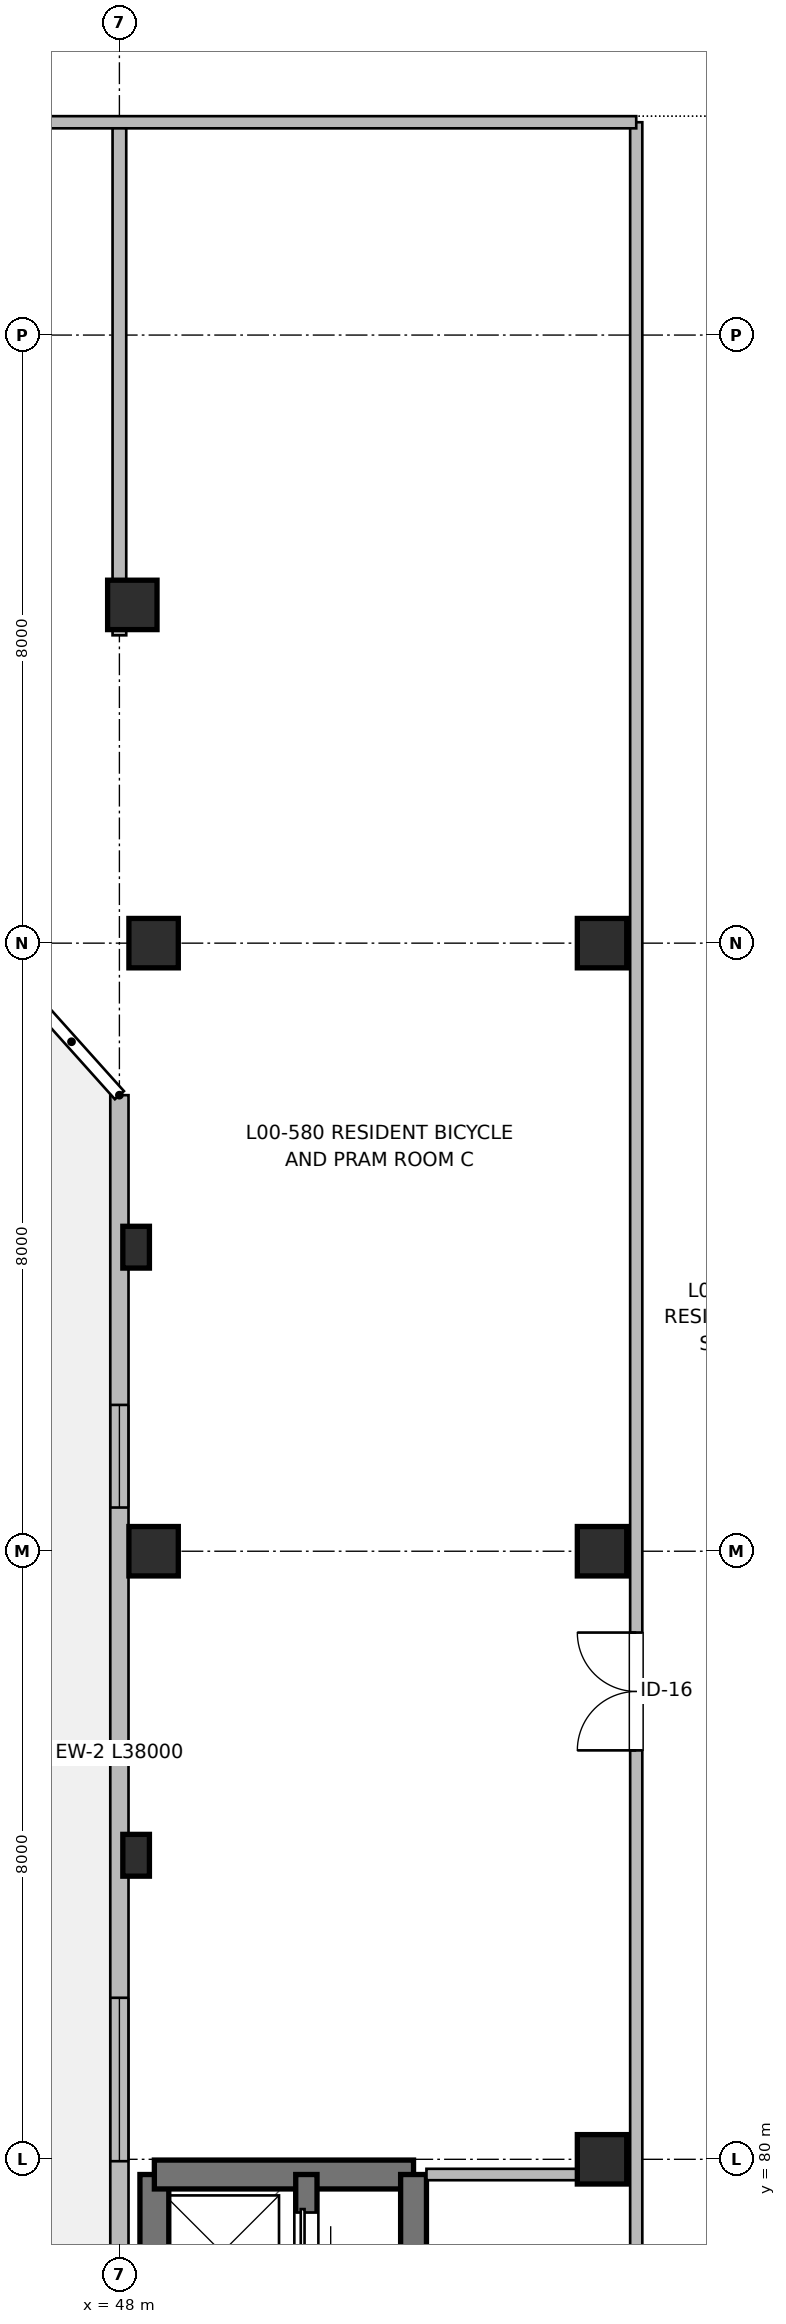
"""IFC4 building model, lengths in metres.
Left out: names, types, materials, properties, quantities, classifications, styles, units other than length and angle.
Written with IfcOpenShell. Run it as: python <this file> out.ifc"""

import sys

from ifc_helpers import new_model, si_unit, direction, frame, frame_2d, origin, origin_2d, place, context, subcontext, project, spatial, rectangle, extrude, element, fill, save


model = new_model("IFC4")
c1 = context("Model", 3, precision=1e-05, world=origin(), true_north=direction((0.0, 1.0)))
c2 = subcontext(c1, "Body", "Model", "MODEL_VIEW")
j1 = project(units=[si_unit("LENGTHUNIT", "METRE"), si_unit("PLANEANGLEUNIT", "RADIAN")], contexts=[c1])
p1 = place(None, origin())
s1 = spatial("IfcSite", under=j1, at=p1, CompositionType="ELEMENT")
p2 = place(p1, origin())
s2 = spatial("IfcBuilding", under=s1, at=p2, CompositionType="ELEMENT")
p3 = place(p2, origin())
s3 = spatial("IfcBuildingStorey", under=s2, at=p3, CompositionType="ELEMENT", Elevation=0.0)
p4 = place(p3, frame((48.17, 100.45, 0.0), z_axis=(0.0, 0.0, 1.0), x_axis=(1.0, 0.0, 0.0)))
e1 = element("IfcColumn", 1, at=p4, inside=s3, PredefinedType="COLUMN", context=c2, shape_type="SweptSolid", body=[
    extrude(rectangle(XDim=0.65, YDim=0.65, at=origin_2d()), origin(), (0.0, 0.0, 1.0), 4.16),
])
for number, where, z_axis, x_axis in (
    (2, (48.22, 84.0, 0.0), (0.0, 0.0, 1.0), (1.0, 0.0, 0.0)),
    (3, (48.22, 92.0, 0.0), (0.0, 0.0, 1.0), (1.0, 0.0, 0.0)),
):
    element("IfcColumn", number, at=place(p3, frame(where, z_axis=z_axis, x_axis=x_axis)), inside=s3, PredefinedType="PILASTER", context=c2, shape_type="SweptSolid", body=[
        extrude(rectangle(XDim=0.35, YDim=0.55, at=origin_2d()), origin(), (0.0, 0.0, 1.0), 4.16),
    ])
for number, where, z_axis, x_axis in (
    (4, (48.45, 88.0, 0.0), (0.0, 0.0, 1.0), (1.0, 0.0, 0.0)),
    (5, (48.45, 96.0, 0.0), (0.0, 0.0, 1.0), (1.0, 0.0, 0.0)),
    (6, (54.35, 80.0, 0.0), (0.0, 0.0, 1.0), (1.0, 0.0, 0.0)),
    (7, (54.35, 88.0, 0.0), (0.0, 0.0, 1.0), (1.0, 0.0, 0.0)),
    (8, (54.35, 96.0, 0.0), (0.0, 0.0, 1.0), (1.0, 0.0, 0.0)),
):
    element("IfcColumn", number, at=place(p3, frame(where, z_axis=z_axis, x_axis=x_axis)), inside=s3, PredefinedType="COLUMN", context=c2, shape_type="SweptSolid", body=[
        extrude(rectangle(XDim=0.65, YDim=0.65, at=origin_2d()), origin(), (0.0, 0.0, 1.0), 4.16),
    ])
p5 = place(p3, frame((48.46, 67.35, 0.0), z_axis=(0.0, 0.0, 1.0), x_axis=(0.0, 1.0, 0.0)))
e9 = element("IfcWall", 9, at=p5, inside=s3, PredefinedType="SHEAR", context=c2, shape_type="SweptSolid", body=[
    extrude(rectangle(XDim=12.45, YDim=0.38, at=frame_2d((6.225, 0.0))), origin(), (0.0, 0.0, 1.0), 4.16),
])
p6 = place(p5, frame((2.2, 0.0, 1.2)))
e10 = element("IfcOpeningElement", 10, at=p6, cuts=e9, PredefinedType="OPENING", context=c2, shape_type="SweptSolid", body=[
    extrude(rectangle(XDim=0.95, YDim=1.25, at=frame_2d((0.475, 0.625))), frame((0.0, 0.2, 0.0), z_axis=(0.0, -1.0, 0.0), x_axis=(1.0, 0.0, 0.0)), (0.0, 0.0, 1.0), 0.4),
])
p7 = place(p3, frame((48.46, 79.8, 0.0), z_axis=(0.0, 0.0, 1.0), x_axis=(1.0, 0.0, 0.0)))
e11 = element("IfcWall", 11, at=p7, inside=s3, PredefinedType="SHEAR", context=c2, shape_type="SweptSolid", body=[
    extrude(rectangle(XDim=3.41, YDim=0.38, at=frame_2d((1.705, 0.0))), origin(), (0.0, 0.0, 1.0), 4.16),
])
p8 = place(p3, frame((51.87, 79.8, 0.0), z_axis=(0.0, 0.0, 1.0), x_axis=(0.0, -1.0, 0.0)))
e12 = element("IfcWall", 12, at=p8, inside=s3, PredefinedType="SHEAR", context=c2, shape_type="SweptSolid", body=[
    extrude(rectangle(XDim=12.45, YDim=0.34, at=frame_2d((6.225, 0.0))), origin(), (0.0, 0.0, 1.0), 4.16),
])
p9 = place(p8, frame((10.85, 0.0, 0.0)))
e13 = element("IfcOpeningElement", 13, at=p9, cuts=e12, PredefinedType="OPENING", context=c2, shape_type="SweptSolid", body=[
    extrude(rectangle(XDim=1.05, YDim=2.15, at=frame_2d((0.525, 1.075))), frame((0.0, 0.18, 0.0), z_axis=(0.0, -1.0, 0.0), x_axis=(1.0, 0.0, 0.0)), (0.0, 0.0, 1.0), 0.36),
])
p10 = place(p3, frame((50.46, 74.55, 0.0), z_axis=(0.0, 0.0, 1.0), x_axis=(0.0, 1.0, 0.0)))
e14 = element("IfcWall", 14, at=p10, inside=s3, PredefinedType="SHEAR", context=c2, shape_type="SweptSolid", body=[
    extrude(rectangle(XDim=5.25, YDim=0.28, at=frame_2d((2.625, 0.0))), origin(), (0.0, 0.0, 1.0), 4.16),
])
p11 = place(p10, frame((1.15, 0.0, 0.0)))
e15 = element("IfcOpeningElement", 15, at=p11, cuts=e14, PredefinedType="OPENING", context=c2, shape_type="SweptSolid", body=[
    extrude(rectangle(XDim=1.0, YDim=2.15, at=frame_2d((0.5, 1.075))), frame((0.0, 0.15, 0.0), z_axis=(0.0, -1.0, 0.0), x_axis=(1.0, 0.0, 0.0)), (0.0, 0.0, 1.0), 0.3),
])
p12 = place(p10, frame((3.85, 0.0, 0.0)))
e16 = element("IfcOpeningElement", 16, at=p12, cuts=e14, PredefinedType="OPENING", context=c2, shape_type="SweptSolid", body=[
    extrude(rectangle(XDim=0.9, YDim=2.15, at=frame_2d((0.45, 1.075))), frame((0.0, 0.15, 0.0), z_axis=(0.0, -1.0, 0.0), x_axis=(1.0, 0.0, 0.0)), (0.0, 0.0, 1.0), 0.3),
])
p13 = place(p3, frame((48.0, 56.0, 0.0), z_axis=(0.0, 0.0, 1.0), x_axis=(0.0, 1.0, 0.0)))
e17 = element("IfcWall", 17, at=p13, inside=s3, PredefinedType="SOLIDWALL", context=c2, shape_type="SweptSolid", body=[
    extrude(rectangle(XDim=38.0, YDim=0.24, at=frame_2d((19.0, 0.0))), origin(), (0.0, 0.0, 1.0), 3.94),
])
p14 = place(p13, frame((3.675, 0.0, 0.95)))
e18 = element("IfcOpeningElement", 18, at=p14, cuts=e17, PredefinedType="OPENING", context=c2, shape_type="SweptSolid", body=[
    extrude(rectangle(XDim=2.15, YDim=1.8, at=frame_2d((1.075, 0.9))), frame((0.0, 0.13, 0.0), z_axis=(0.0, -1.0, 0.0), x_axis=(1.0, 0.0, 0.0)), (0.0, 0.0, 1.0), 0.26),
])
p15 = place(p13, frame((13.575, 0.0, 0.95)))
e19 = element("IfcOpeningElement", 19, at=p15, cuts=e17, PredefinedType="OPENING", context=c2, shape_type="SweptSolid", body=[
    extrude(rectangle(XDim=1.35, YDim=1.3, at=frame_2d((0.675, 0.65))), frame((0.0, 0.13, 0.0), z_axis=(0.0, -1.0, 0.0), x_axis=(1.0, 0.0, 0.0)), (0.0, 0.0, 1.0), 0.26),
])
p16 = place(p13, frame((23.975, 0.0, 0.95)))
e20 = element("IfcOpeningElement", 20, at=p16, cuts=e17, PredefinedType="OPENING", context=c2, shape_type="SweptSolid", body=[
    extrude(rectangle(XDim=2.15, YDim=1.8, at=frame_2d((1.075, 0.9))), frame((0.0, 0.13, 0.0), z_axis=(0.0, -1.0, 0.0), x_axis=(1.0, 0.0, 0.0)), (0.0, 0.0, 1.0), 0.26),
])
p17 = place(p13, frame((32.575, 0.0, 0.95)))
e21 = element("IfcOpeningElement", 21, at=p17, cuts=e17, PredefinedType="OPENING", context=c2, shape_type="SweptSolid", body=[
    extrude(rectangle(XDim=1.35, YDim=1.3, at=frame_2d((0.675, 0.65))), frame((0.0, 0.13, 0.0), z_axis=(0.0, -1.0, 0.0), x_axis=(1.0, 0.0, 0.0)), (0.0, 0.0, 1.0), 0.26),
])
p18 = place(p3, frame((52.04, 79.8, 0.0), z_axis=(0.0, 0.0, 1.0), x_axis=(1.0, 0.0, 0.0)))
e22 = element("IfcWall", 22, at=p18, inside=s3, PredefinedType="PARTITIONING", context=c2, shape_type="SweptSolid", body=[
    extrude(rectangle(XDim=2.68, YDim=0.15, at=frame_2d((1.34, 0.0))), origin(), (0.0, 0.0, 1.0), 3.895),
])
p19 = place(p3, frame((54.8, 56.18, 0.0), z_axis=(0.0, 0.0, 1.0), x_axis=(0.0, 1.0, 0.0)))
e23 = element("IfcWall", 23, at=p19, inside=s3, PredefinedType="PARTITIONING", context=c2, shape_type="SweptSolid", body=[
    extrude(rectangle(XDim=50.62, YDim=0.16, at=frame_2d((25.31, 0.0))), origin(), (0.0, 0.0, 1.0), 3.895),
])
p20 = place(p19, frame((12.82, 0.0, 0.0)))
e24 = element("IfcOpeningElement", 24, at=p20, cuts=e23, PredefinedType="OPENING", context=c2, shape_type="SweptSolid", body=[
    extrude(rectangle(XDim=1.1, YDim=2.15, at=frame_2d((0.55, 1.075))), frame((0.0, 0.09, 0.0), z_axis=(0.0, -1.0, 0.0), x_axis=(1.0, 0.0, 0.0)), (0.0, 0.0, 1.0), 0.18),
])
p21 = place(p19, frame((19.22, 0.0, 0.0)))
e25 = element("IfcOpeningElement", 25, at=p21, cuts=e23, PredefinedType="OPENING", context=c2, shape_type="SweptSolid", body=[
    extrude(rectangle(XDim=1.6, YDim=2.15, at=frame_2d((0.8, 1.075))), frame((0.0, 0.09, 0.0), z_axis=(0.0, -1.0, 0.0), x_axis=(1.0, 0.0, 0.0)), (0.0, 0.0, 1.0), 0.18),
])
p22 = place(p19, frame((3.5, 0.0, 0.0)))
e26 = element("IfcOpeningElement", 26, at=p22, cuts=e23, PredefinedType="OPENING", context=c2, shape_type="SweptSolid", body=[
    extrude(rectangle(XDim=1.05, YDim=2.15, at=frame_2d((0.525, 1.075))), frame((0.0, 0.09, 0.0), z_axis=(0.0, -1.0, 0.0), x_axis=(1.0, 0.0, 0.0)), (0.0, 0.0, 1.0), 0.18),
])
p23 = place(p19, frame((29.2, 0.0, 0.0)))
e27 = element("IfcOpeningElement", 27, at=p23, cuts=e23, PredefinedType="OPENING", context=c2, shape_type="SweptSolid", body=[
    extrude(rectangle(XDim=1.55, YDim=2.2, at=frame_2d((0.775, 1.1))), frame((0.0, 0.09, 0.0), z_axis=(0.0, -1.0, 0.0), x_axis=(1.0, 0.0, 0.0)), (0.0, 0.0, 1.0), 0.18),
])
p24 = place(p3, frame((39.68, 106.8, 0.0), z_axis=(0.0, 0.0, 1.0), x_axis=(1.0, 0.0, 0.0)))
e28 = element("IfcWall", 28, at=p24, inside=s3, PredefinedType="PARTITIONING", context=c2, shape_type="SweptSolid", body=[
    extrude(rectangle(XDim=15.12, YDim=0.16, at=frame_2d((7.56, 0.0))), origin(), (0.0, 0.0, 1.0), 3.895),
])
p25 = place(p3, frame((48.0, 100.05, 0.0), z_axis=(0.0, 0.0, 1.0), x_axis=(0.0, 1.0, 0.0)))
e29 = element("IfcWall", 29, at=p25, inside=s3, PredefinedType="PARTITIONING", context=c2, shape_type="SweptSolid", body=[
    extrude(rectangle(XDim=6.67, YDim=0.18, at=frame_2d((3.335, 0.0))), origin(), (0.0, 0.0, 1.0), 3.64),
])
p26 = place(p12, origin())
e30 = element("IfcDoor", 30, at=p26, inside=s3, OperationType="SLIDING_TO_RIGHT", PredefinedType="DOOR", context=c2, shape_type="SweptSolid", body=[
    extrude(rectangle(XDim=0.9, YDim=2.15, at=frame_2d((0.45, 1.075))), frame((0.0, 0.025, 0.0), z_axis=(0.0, -1.0, 0.0), x_axis=(1.0, 0.0, 0.0)), (0.0, 0.0, 1.0), 0.05),
])
fill(e16, e30)
p27 = place(p16, origin())
e31 = element("IfcWindow", 31, at=p27, inside=s3, PartitioningType="SINGLE_PANEL", PredefinedType="WINDOW", context=c2, shape_type="SweptSolid", body=[
    extrude(rectangle(XDim=2.15, YDim=1.8, at=frame_2d((1.075, 0.9))), frame((0.0, 0.03, 0.0), z_axis=(0.0, -1.0, 0.0), x_axis=(1.0, 0.0, 0.0)), (0.0, 0.0, 1.0), 0.06),
])
fill(e20, e31)
p28 = place(p17, origin())
e32 = element("IfcWindow", 32, at=p28, inside=s3, PartitioningType="SINGLE_PANEL", PredefinedType="WINDOW", context=c2, shape_type="SweptSolid", body=[
    extrude(rectangle(XDim=1.35, YDim=1.3, at=frame_2d((0.675, 0.65))), frame((0.0, 0.03, 0.0), z_axis=(0.0, -1.0, 0.0), x_axis=(1.0, 0.0, 0.0)), (0.0, 0.0, 1.0), 0.06),
])
fill(e21, e32)
p29 = place(p23, origin())
e33 = element("IfcDoor", 33, at=p29, inside=s3, OperationType="DOUBLE_DOOR_SINGLE_SWING", PredefinedType="DOOR", context=c2, shape_type="SweptSolid", body=[
    extrude(rectangle(XDim=1.55, YDim=2.2, at=frame_2d((0.775, 1.1))), frame((0.0, 0.025, 0.0), z_axis=(0.0, -1.0, 0.0), x_axis=(1.0, 0.0, 0.0)), (0.0, 0.0, 1.0), 0.05),
])
fill(e27, e33)
save(model, sys.argv[1])
